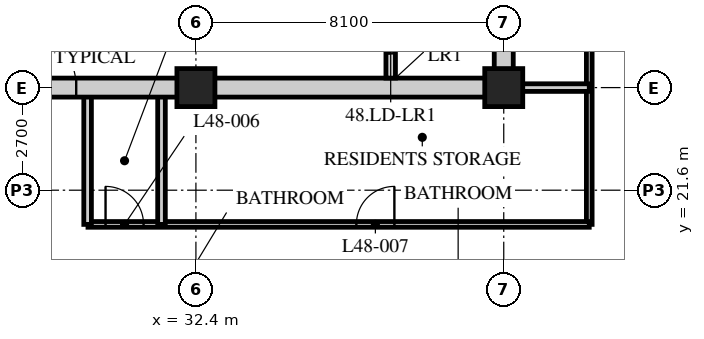
"""IFC4 building model, lengths in metres.
Left out: names, types, materials, properties, quantities, classifications, styles, units other than length and angle.
Written with IfcOpenShell. Run it as: python <this file> out.ifc"""

import sys

from ifc_helpers import new_model, si_unit, direction, frame, frame_2d, origin, origin_2d, place, context, subcontext, project, spatial, rectangle, hollow_rectangle, extrude, element, fill, save


model = new_model("IFC4")
c1 = context("Model", 3, precision=1e-05, world=origin(), true_north=direction((0.0, 1.0)))
c2 = subcontext(c1, "Body", "Model", "MODEL_VIEW")
j1 = project(units=[si_unit("LENGTHUNIT", "METRE"), si_unit("PLANEANGLEUNIT", "RADIAN")], contexts=[c1])
p1 = place(None, origin())
s1 = spatial("IfcSite", under=j1, at=p1, CompositionType="ELEMENT")
p2 = place(p1, origin())
s2 = spatial("IfcBuilding", under=s1, at=p2, CompositionType="ELEMENT")
p3 = place(p2, frame((0.0, 0.0, 188.4)))
s3 = spatial("IfcBuildingStorey", under=s2, at=p3, CompositionType="ELEMENT", Elevation=188.4)
for number, where, z_axis, x_axis in (
    (1, (32.4, 24.3, 0.0), (0.0, 0.0, 1.0), (1.0, 0.0, 0.0)),
    (2, (40.5, 24.3, 0.0), (0.0, 0.0, 1.0), (1.0, 0.0, 0.0)),
):
    element("IfcColumn", number, at=place(p3, frame(where, z_axis=z_axis, x_axis=x_axis)), inside=s3, PredefinedType="COLUMN", context=c2, shape_type="SweptSolid", body=[
        extrude(hollow_rectangle(XDim=1.0, YDim=1.0, WallThickness=0.1, at=origin_2d()), origin(), (0.0, 0.0, 1.0), 3.6),
    ])
p4 = place(p3, frame((42.75, 20.7, 0.0), z_axis=(0.0, 0.0, 1.0), x_axis=(0.0, 1.0, 0.0)))
e3 = element("IfcWall", 3, at=p4, inside=s3, PredefinedType="PARTITIONING", context=c2, shape_type="SweptSolid", body=[
    extrude(rectangle(XDim=24.75, YDim=0.15, at=frame_2d((12.375, 0.0))), origin(), (0.0, 0.0, 1.0), 3.39),
])
p5 = place(p4, frame((7.15, 0.0, 0.0)))
e4 = element("IfcOpeningElement", 4, at=p5, cuts=e3, PredefinedType="OPENING", context=c2, shape_type="SweptSolid", body=[
    extrude(rectangle(XDim=1.0, YDim=2.1, at=frame_2d((0.5, 1.05))), frame((0.0, 0.085, 0.0), z_axis=(0.0, -1.0, 0.0), x_axis=(1.0, 0.0, 0.0)), (0.0, 0.0, 1.0), 0.17),
])
p6 = place(p4, frame((15.25, 0.0, 0.0)))
e5 = element("IfcOpeningElement", 5, at=p6, cuts=e3, PredefinedType="OPENING", context=c2, shape_type="SweptSolid", body=[
    extrude(rectangle(XDim=1.0, YDim=2.1, at=frame_2d((0.5, 1.05))), frame((0.0, 0.085, 0.0), z_axis=(0.0, -1.0, 0.0), x_axis=(1.0, 0.0, 0.0)), (0.0, 0.0, 1.0), 0.17),
])
p7 = place(p3, frame((29.56, 20.7, 0.0), z_axis=(0.0, 0.0, 1.0), x_axis=(1.0, 0.0, 0.0)))
e6 = element("IfcWall", 6, at=p7, inside=s3, PredefinedType="PARTITIONING", context=c2, shape_type="SweptSolid", body=[
    extrude(rectangle(XDim=13.19, YDim=0.15, at=frame_2d((6.595, 0.0))), origin(), (0.0, 0.0, 1.0), 3.39),
])
p8 = place(p7, frame((0.462, 0.0, 0.0)))
e7 = element("IfcOpeningElement", 7, at=p8, cuts=e6, PredefinedType="OPENING", context=c2, shape_type="SweptSolid", body=[
    extrude(rectangle(XDim=1.0, YDim=2.1, at=frame_2d((0.5, 1.05))), frame((0.0, 0.085, 0.0), z_axis=(0.0, -1.0, 0.0), x_axis=(1.0, 0.0, 0.0)), (0.0, 0.0, 1.0), 0.17),
])
p9 = place(p7, frame((7.062, 0.0, 0.0)))
e8 = element("IfcOpeningElement", 8, at=p9, cuts=e6, PredefinedType="OPENING", context=c2, shape_type="SweptSolid", body=[
    extrude(rectangle(XDim=1.0, YDim=2.1, at=frame_2d((0.5, 1.05))), frame((0.0, 0.085, 0.0), z_axis=(0.0, -1.0, 0.0), x_axis=(1.0, 0.0, 0.0)), (0.0, 0.0, 1.0), 0.17),
])
for number, where, z_axis, x_axis in (
    (9, (31.494, 20.7, 0.0), (0.0, 0.0, 1.0), (0.0, 1.0, 0.0)),
    (10, (29.55, 20.7, 0.0), (0.0, 0.0, 1.0), (0.0, 1.0, 0.0)),
):
    element("IfcWall", number, at=place(p3, frame(where, z_axis=z_axis, x_axis=x_axis)), inside=s3, PredefinedType="SOLIDWALL", context=c2, shape_type="SweptSolid", body=[
        extrude(rectangle(XDim=3.6, YDim=0.2, at=frame_2d((1.8, 0.0))), origin(), (0.0, 0.0, 1.0), 3.39),
    ])
p10 = place(p3, frame((40.5, 24.3, 0.0), z_axis=(0.0, 0.0, 1.0), x_axis=(1.0, 0.0, 0.0)))
e11 = element("IfcWall", 11, at=p10, inside=s3, PredefinedType="SOLIDWALL", context=c2, shape_type="SweptSolid", body=[
    extrude(rectangle(XDim=2.25, YDim=0.2, at=frame_2d((1.125, 0.0))), origin(), (0.0, 0.0, 1.0), 3.39),
])
p11 = place(p3, frame((15.95, 24.3, 0.0), z_axis=(0.0, 0.0, 1.0), x_axis=(1.0, 0.0, 0.0)))
e12 = element("IfcWall", 12, at=p11, inside=s3, PredefinedType="SOLIDWALL", context=c2, shape_type="SweptSolid", body=[
    extrude(rectangle(XDim=24.8, YDim=0.5, at=frame_2d((12.4, 0.0))), origin(), (0.0, 0.0, 1.0), 2.74),
])
p12 = place(p11, frame((11.5, 0.0, 0.0)))
e13 = element("IfcOpeningElement", 13, at=p12, cuts=e12, PredefinedType="OPENING", context=c2, shape_type="SweptSolid", body=[
    extrude(rectangle(XDim=1.8, YDim=2.4, at=frame_2d((0.9, 1.2))), frame((0.0, 0.26, 0.0), z_axis=(0.0, -1.0, 0.0), x_axis=(1.0, 0.0, 0.0)), (0.0, 0.0, 1.0), 0.52),
])
p13 = place(p3, frame((40.5, 24.55, 0.0), z_axis=(0.0, 0.0, 1.0), x_axis=(0.0, 1.0, 0.0)))
e14 = element("IfcWall", 14, at=p13, inside=s3, PredefinedType="SOLIDWALL", context=c2, shape_type="SweptSolid", body=[
    extrude(rectangle(XDim=15.7, YDim=0.5, at=frame_2d((7.85, 0.0))), origin(), (0.0, 0.0, 1.0), 2.778),
])
p14 = place(p3, frame((37.525, 24.55, 0.0), z_axis=(0.0, 0.0, 1.0), x_axis=(0.0, 1.0, 0.0)))
e15 = element("IfcWall", 15, at=p14, inside=s3, PredefinedType="SOLIDWALL", context=c2, shape_type="SweptSolid", body=[
    extrude(rectangle(XDim=7.75, YDim=0.25, at=frame_2d((3.875, 0.0))), origin(), (0.0, 0.0, 1.0), 3.39),
])
p15 = place(p14, frame((0.65, 0.0, 0.0)))
e16 = element("IfcOpeningElement", 16, at=p15, cuts=e15, PredefinedType="OPENING", context=c2, shape_type="SweptSolid", body=[
    extrude(rectangle(XDim=1.1, YDim=2.4, at=frame_2d((0.55, 1.2))), frame((0.0, 0.135, 0.0), z_axis=(0.0, -1.0, 0.0), x_axis=(1.0, 0.0, 0.0)), (0.0, 0.0, 1.0), 0.27),
])
p16 = place(p14, frame((3.25, 0.0, 0.0)))
e17 = element("IfcOpeningElement", 17, at=p16, cuts=e15, PredefinedType="OPENING", context=c2, shape_type="SweptSolid", body=[
    extrude(rectangle(XDim=1.1, YDim=2.4, at=frame_2d((0.55, 1.2))), frame((0.0, 0.135, 0.0), z_axis=(0.0, -1.0, 0.0), x_axis=(1.0, 0.0, 0.0)), (0.0, 0.0, 1.0), 0.27),
])
p17 = place(p14, frame((5.85, 0.0, 0.0)))
e18 = element("IfcOpeningElement", 18, at=p17, cuts=e15, PredefinedType="OPENING", context=c2, shape_type="SweptSolid", body=[
    extrude(rectangle(XDim=1.1, YDim=2.4, at=frame_2d((0.55, 1.2))), frame((0.0, 0.135, 0.0), z_axis=(0.0, -1.0, 0.0), x_axis=(1.0, 0.0, 0.0)), (0.0, 0.0, 1.0), 0.27),
])
p18 = place(p8, origin())
e19 = element("IfcDoor", 19, at=p18, inside=s3, OperationType="SINGLE_SWING_LEFT", PredefinedType="DOOR", context=c2, shape_type="SweptSolid", body=[
    extrude(rectangle(XDim=1.0, YDim=2.1, at=frame_2d((0.5, 1.05))), frame((0.0, 0.025, 0.0), z_axis=(0.0, -1.0, 0.0), x_axis=(1.0, 0.0, 0.0)), (0.0, 0.0, 1.0), 0.05),
])
fill(e7, e19)
p19 = place(p9, origin())
e20 = element("IfcDoor", 20, at=p19, inside=s3, OperationType="SINGLE_SWING_RIGHT", PredefinedType="DOOR", context=c2, shape_type="SweptSolid", body=[
    extrude(rectangle(XDim=1.0, YDim=2.1, at=frame_2d((0.5, 1.05))), frame((0.0, 0.025, 0.0), z_axis=(0.0, -1.0, 0.0), x_axis=(1.0, 0.0, 0.0)), (0.0, 0.0, 1.0), 0.05),
])
fill(e8, e20)
p20 = place(p15, origin())
e21 = element("IfcDoor", 21, at=p20, inside=s3, OperationType="DOUBLE_DOOR_SLIDING", PredefinedType="DOOR", context=c2, shape_type="SweptSolid", body=[
    extrude(rectangle(XDim=1.1, YDim=2.4, at=frame_2d((0.55, 1.2))), frame((0.0, 0.025, 0.0), z_axis=(0.0, -1.0, 0.0), x_axis=(1.0, 0.0, 0.0)), (0.0, 0.0, 1.0), 0.05),
])
fill(e16, e21)
p21 = place(p12, origin())
e22 = element("IfcDoor", 22, at=p21, inside=s3, OperationType="DOUBLE_DOOR_SINGLE_SWING", PredefinedType="DOOR", context=c2, shape_type="SweptSolid", body=[
    extrude(rectangle(XDim=1.8, YDim=2.4, at=frame_2d((0.9, 1.2))), frame((0.0, 0.025, 0.0), z_axis=(0.0, -1.0, 0.0), x_axis=(1.0, 0.0, 0.0)), (0.0, 0.0, 1.0), 0.05),
])
fill(e13, e22)
save(model, sys.argv[1])
